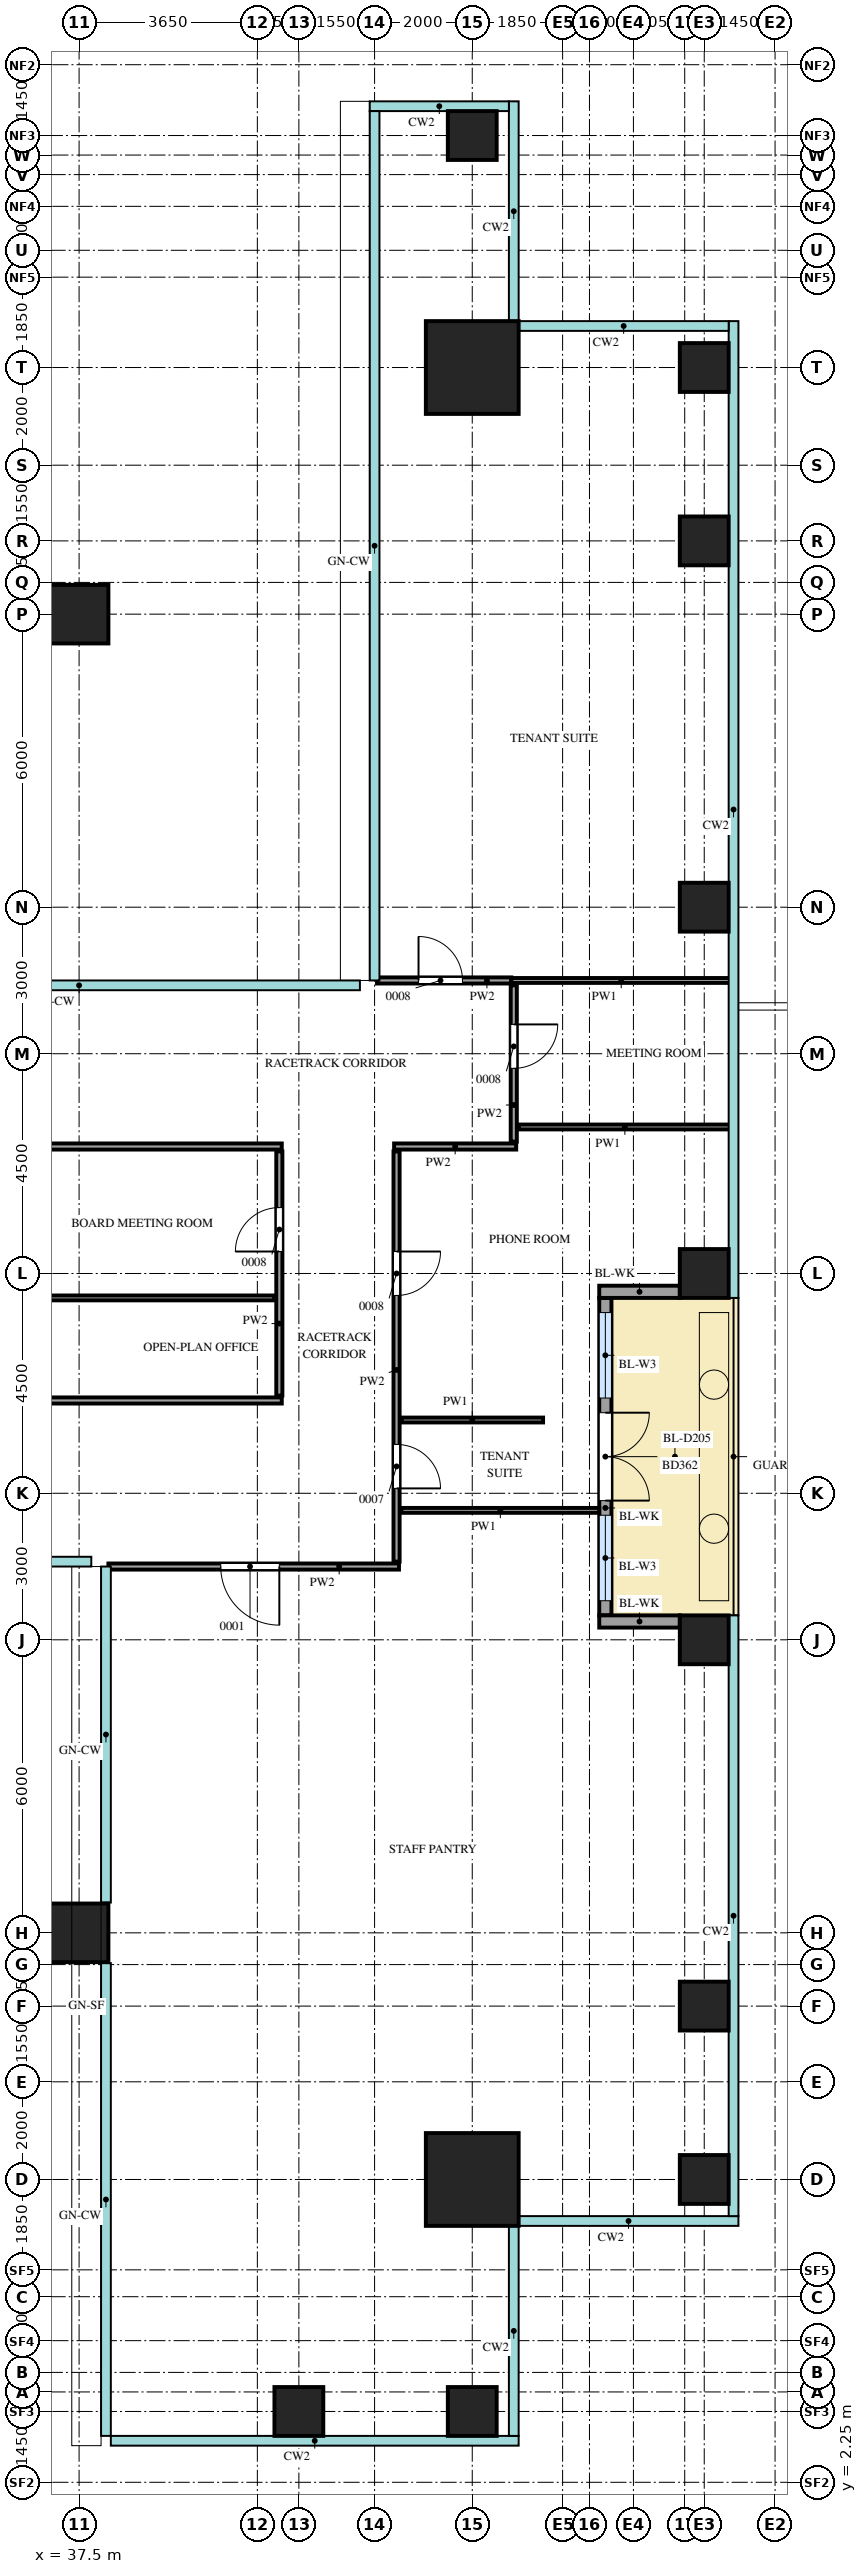
"""IFC4 building model, lengths in metres.
Left out: names, types, materials, properties, quantities, classifications, styles, units other than length and angle.
Written with IfcOpenShell. Run it as: python <this file> out.ifc"""

import sys

from ifc_helpers import new_model, si_unit, direction, frame, frame_2d, origin, origin_2d, place, context, subcontext, project, spatial, rectangle, extrude, source, transform, mapped, element, fill, save


model = new_model("IFC4")
c1 = context("Model", 3, precision=1e-05, world=origin(), true_north=direction((0.0, 1.0)))
c2 = subcontext(c1, "Body", "Model", "MODEL_VIEW")
j1 = project(units=[si_unit("LENGTHUNIT", "METRE"), si_unit("PLANEANGLEUNIT", "RADIAN")], contexts=[c1])
p1 = place(None, origin())
s1 = spatial("IfcSite", under=j1, at=p1, CompositionType="ELEMENT")
p2 = place(p1, origin())
s2 = spatial("IfcBuilding", under=s1, at=p2, CompositionType="ELEMENT")
p3 = place(p2, frame((0.0, 0.0, 168.7)))
s3 = spatial("IfcBuildingStorey", under=s2, at=p3, CompositionType="ELEMENT", Elevation=168.7)
m1 = source(origin(), c2, "Body", "SweptSolid", [
    extrude(rectangle(XDim=1.9, YDim=1.9, at=origin_2d()), origin(), (0.0, 0.0, 1.0), 4.0),
])
for number, where, z_axis, x_axis in (
    (1, (45.55, 45.55, 0.0), (0.0, 0.0, 1.0), (1.0, 0.0, 0.0)),
    (2, (45.55, 8.45, 0.0), (0.0, 0.0, 1.0), (1.0, 0.0, 0.0)),
):
    element("IfcColumn", number, at=place(p3, frame(where, z_axis=z_axis, x_axis=x_axis)), inside=s3, PredefinedType="COLUMN", context=c2, shape_type="MappedRepresentation", body=[
        mapped(m1, transform((0.0, 0.0, 0.0))),
    ])
m2 = source(origin(), c2, "Body", "SweptSolid", [
    extrude(rectangle(XDim=1.0, YDim=1.0, at=origin_2d()), origin(), (0.0, 0.0, 1.0), 3.75),
])
for number, where, z_axis, x_axis in (
    (3, (42.0, 3.7, 0.0), (0.0, 0.0, 1.0), (1.0, 0.0, 0.0)),
    (4, (45.55, 3.7, 0.0), (0.0, 0.0, 1.0), (1.0, 0.0, 0.0)),
    (5, (50.3, 8.45, 0.0), (0.0, 0.0, 1.0), (1.0, 0.0, 0.0)),
    (6, (50.3, 12.0, 0.0), (0.0, 0.0, 1.0), (1.0, 0.0, 0.0)),
    (7, (50.3, 19.5, 0.0), (0.0, 0.0, 1.0), (1.0, 0.0, 0.0)),
    (8, (50.3, 27.0, 0.0), (0.0, 0.0, 1.0), (1.0, 0.0, 0.0)),
    (9, (50.3, 34.5, 0.0), (0.0, 0.0, 1.0), (1.0, 0.0, 0.0)),
    (10, (50.3, 42.0, 0.0), (0.0, 0.0, 1.0), (1.0, 0.0, 0.0)),
    (11, (50.3, 45.55, 0.0), (0.0, 0.0, 1.0), (1.0, 0.0, 0.0)),
    (12, (45.55, 50.3, 0.0), (0.0, 0.0, 1.0), (1.0, 0.0, 0.0)),
):
    element("IfcColumn", number, at=place(p3, frame(where, z_axis=z_axis, x_axis=x_axis)), inside=s3, PredefinedType="COLUMN", context=c2, shape_type="MappedRepresentation", body=[
        mapped(m2, transform((0.0, 0.0, 0.0))),
    ])
m3 = source(origin(), c2, "Body", "SweptSolid", [
    extrude(rectangle(XDim=1.2, YDim=1.2, at=origin_2d()), origin(), (0.0, 0.0, 1.0), 4.0),
])
for number, where, z_axis, x_axis in (
    (13, (37.5, 13.5, 0.0), (0.0, 0.0, 1.0), (1.0, 0.0, 0.0)),
    (14, (37.5, 40.5, 0.0), (0.0, 0.0, 1.0), (1.0, 0.0, 0.0)),
):
    element("IfcColumn", number, at=place(p3, frame(where, z_axis=z_axis, x_axis=x_axis)), inside=s3, PredefinedType="COLUMN", context=c2, shape_type="MappedRepresentation", body=[
        mapped(m3, transform((0.0, 0.0, 0.0))),
    ])
m4 = source(origin(), c2, "Body", "SweptSolid", [
    extrude(rectangle(XDim=6.5, YDim=0.25, at=frame_2d((3.25, 0.0))), origin(), (0.0, 0.0, 1.0), 3.15),
])
p4 = place(p3, frame((48.275, 20.0, 0.0), z_axis=(0.0, 0.0, 1.0), x_axis=(0.0, 1.0, 0.0)))
e15 = element("IfcWall", 15, at=p4, inside=s3, PredefinedType="SOLIDWALL", context=c2, shape_type="MappedRepresentation", body=[
    mapped(m4, transform((0.0, 0.0, 0.0))),
])
m5 = source(origin(), c2, "Body", "SweptSolid", [
    extrude(rectangle(XDim=1.75, YDim=2.4, at=frame_2d((0.875, 1.2))), frame((0.0, 0.135, 0.0), z_axis=(0.0, -1.0, 0.0), x_axis=(1.0, 0.0, 0.0)), (0.0, 0.0, 1.0), 0.27),
])
p5 = place(p4, frame((0.3, 0.0, 0.0)))
e16 = element("IfcOpeningElement", 16, at=p5, cuts=e15, PredefinedType="OPENING", context=c2, shape_type="MappedRepresentation", body=[
    mapped(m5, transform((0.0, 0.0, 0.0))),
])
p6 = place(p4, frame((4.45, 0.0, 0.0)))
e17 = element("IfcOpeningElement", 17, at=p6, cuts=e15, PredefinedType="OPENING", context=c2, shape_type="MappedRepresentation", body=[
    mapped(m5, transform((0.0, 0.0, 0.0))),
])
m6 = source(origin(), c2, "Body", "SweptSolid", [
    extrude(rectangle(XDim=1.8, YDim=2.4, at=frame_2d((0.9, 1.2))), frame((0.0, 0.135, 0.0), z_axis=(0.0, -1.0, 0.0), x_axis=(1.0, 0.0, 0.0)), (0.0, 0.0, 1.0), 0.27),
])
p7 = place(p4, frame((2.35, 0.0, 0.0)))
e18 = element("IfcOpeningElement", 18, at=p7, cuts=e15, PredefinedType="OPENING", context=c2, shape_type="MappedRepresentation", body=[
    mapped(m6, transform((0.0, 0.0, 0.0))),
])
m7 = source(origin(), c2, "Body", "SweptSolid", [
    extrude(rectangle(XDim=1.65, YDim=0.25, at=frame_2d((0.825, 0.0))), origin(), (0.0, 0.0, 1.0), 3.15),
])
for number, where, z_axis, x_axis in (
    (19, (49.8, 19.875, 0.0), (0.0, 0.0, 1.0), (-1.0, 0.0, 0.0)),
    (20, (49.8, 26.625, 0.0), (0.0, 0.0, 1.0), (-1.0, 0.0, 0.0)),
):
    element("IfcWall", number, at=place(p3, frame(where, z_axis=z_axis, x_axis=x_axis)), inside=s3, PredefinedType="SOLIDWALL", context=c2, shape_type="MappedRepresentation", body=[
        mapped(m7, transform((0.0, 0.0, 0.0))),
    ])
m8 = source(origin(), c2, "Body", "SweptSolid", [
    extrude(rectangle(XDim=5.95, YDim=0.125, at=frame_2d((2.975, 0.0))), origin(), (0.0, 0.0, 1.0), 3.8),
])
p8 = place(p3, frame((38.1, 21.0, 0.0), z_axis=(0.0, 0.0, 1.0), x_axis=(1.0, 0.0, 0.0)))
e21 = element("IfcWall", 21, at=p8, inside=s3, PredefinedType="PARTITIONING", context=c2, shape_type="MappedRepresentation", body=[
    mapped(m8, transform((0.0, 0.0, 0.0))),
])
m9 = source(origin(), c2, "Body", "SweptSolid", [
    extrude(rectangle(XDim=1.2, YDim=2.1, at=frame_2d((0.6, 1.05))), frame((0.0, 0.073, 0.0), z_axis=(0.0, -1.0, 0.0), x_axis=(1.0, 0.0, 0.0)), (0.0, 0.0, 1.0), 0.145),
])
p9 = place(p8, frame((2.3, 0.0, 0.0)))
e22 = element("IfcOpeningElement", 22, at=p9, cuts=e21, PredefinedType="OPENING", context=c2, shape_type="MappedRepresentation", body=[
    mapped(m9, transform((0.0, 0.0, 0.0))),
])
m10 = source(origin(), c2, "Body", "SweptSolid", [
    extrude(rectangle(XDim=8.4, YDim=0.125, at=frame_2d((4.2, 0.0))), origin(), (0.0, 0.0, 1.0), 3.8),
])
p10 = place(p3, frame((44.0, 21.1, 0.0), z_axis=(0.0, 0.0, 1.0), x_axis=(0.0, 1.0, 0.0)))
e23 = element("IfcWall", 23, at=p10, inside=s3, PredefinedType="PARTITIONING", context=c2, shape_type="MappedRepresentation", body=[
    mapped(m10, transform((0.0, 0.0, 0.0))),
])
m11 = source(origin(), c2, "Body", "SweptSolid", [
    extrude(rectangle(XDim=0.9, YDim=2.1, at=frame_2d((0.45, 1.05))), frame((0.0, 0.073, 0.0), z_axis=(0.0, -1.0, 0.0), x_axis=(1.0, 0.0, 0.0)), (0.0, 0.0, 1.0), 0.145),
])
p11 = place(p10, frame((1.5, 0.0, 0.0)))
e24 = element("IfcOpeningElement", 24, at=p11, cuts=e23, PredefinedType="OPENING", context=c2, shape_type="MappedRepresentation", body=[
    mapped(m11, transform((0.0, 0.0, 0.0))),
])
p12 = place(p10, frame((5.45, 0.0, 0.0)))
e25 = element("IfcOpeningElement", 25, at=p12, cuts=e23, PredefinedType="OPENING", context=c2, shape_type="MappedRepresentation", body=[
    mapped(m11, transform((0.0, 0.0, 0.0))),
])
m12 = source(origin(), c2, "Body", "SweptSolid", [
    extrude(rectangle(XDim=4.05, YDim=0.1, at=frame_2d((2.025, 0.0))), origin(), (0.0, 0.0, 1.0), 3.8),
])
p13 = place(p3, frame((44.1, 22.15, 0.0), z_axis=(0.0, 0.0, 1.0), x_axis=(1.0, 0.0, 0.0)))
e26 = element("IfcWall", 26, at=p13, inside=s3, PredefinedType="PARTITIONING", context=c2, shape_type="MappedRepresentation", body=[
    mapped(m12, transform((0.0, 0.0, 0.0))),
])
m13 = source(origin(), c2, "Body", "SweptSolid", [
    extrude(rectangle(XDim=2.9, YDim=0.1, at=frame_2d((1.45, 0.0))), origin(), (0.0, 0.0, 1.0), 3.8),
])
p14 = place(p3, frame((44.1, 24.0, 0.0), z_axis=(0.0, 0.0, 1.0), x_axis=(1.0, 0.0, 0.0)))
e27 = element("IfcWall", 27, at=p14, inside=s3, PredefinedType="PARTITIONING", context=c2, shape_type="MappedRepresentation", body=[
    mapped(m13, transform((0.0, 0.0, 0.0))),
])
m14 = source(origin(), c2, "Body", "SweptSolid", [
    extrude(rectangle(XDim=18.3, YDim=0.125, at=frame_2d((9.15, 0.0))), origin(), (0.0, 0.0, 1.0), 3.8),
])
p15 = place(p3, frame((23.35, 24.4, 0.0), z_axis=(0.0, 0.0, 1.0), x_axis=(1.0, 0.0, 0.0)))
e28 = element("IfcWall", 28, at=p15, inside=s3, PredefinedType="PARTITIONING", context=c2, shape_type="MappedRepresentation", body=[
    mapped(m14, transform((0.0, 0.0, 0.0))),
])
m15 = source(origin(), c2, "Body", "SweptSolid", [
    extrude(rectangle(XDim=5.0, YDim=0.125, at=frame_2d((2.5, 0.0))), origin(), (0.0, 0.0, 1.0), 3.8),
])
p16 = place(p3, frame((41.6, 24.5, 0.0), z_axis=(0.0, 0.0, 1.0), x_axis=(0.0, 1.0, 0.0)))
e29 = element("IfcWall", 29, at=p16, inside=s3, PredefinedType="PARTITIONING", context=c2, shape_type="MappedRepresentation", body=[
    mapped(m15, transform((0.0, 0.0, 0.0))),
])
p17 = place(p16, frame((2.95, 0.0, 0.0)))
e30 = element("IfcOpeningElement", 30, at=p17, cuts=e29, PredefinedType="OPENING", context=c2, shape_type="MappedRepresentation", body=[
    mapped(m11, transform((0.0, 0.0, 0.0))),
])
m16 = source(origin(), c2, "Body", "SweptSolid", [
    extrude(rectangle(XDim=18.0, YDim=0.1, at=frame_2d((9.0, 0.0))), origin(), (0.0, 0.0, 1.0), 3.8),
])
p18 = place(p3, frame((23.5, 26.5, 0.0), z_axis=(0.0, 0.0, 1.0), x_axis=(1.0, 0.0, 0.0)))
e31 = element("IfcWall", 31, at=p18, inside=s3, PredefinedType="PARTITIONING", context=c2, shape_type="MappedRepresentation", body=[
    mapped(m16, transform((0.0, 0.0, 0.0))),
])
p19 = place(p3, frame((23.35, 29.6, 0.0), z_axis=(0.0, 0.0, 1.0), x_axis=(1.0, 0.0, 0.0)))
e32 = element("IfcWall", 32, at=p19, inside=s3, PredefinedType="PARTITIONING", context=c2, shape_type="MappedRepresentation", body=[
    mapped(m14, transform((0.0, 0.0, 0.0))),
])
m17 = source(origin(), c2, "Body", "SweptSolid", [
    extrude(rectangle(XDim=2.5, YDim=0.125, at=frame_2d((1.25, 0.0))), origin(), (0.0, 0.0, 1.0), 3.8),
])
p20 = place(p3, frame((43.95, 29.6, 0.0), z_axis=(0.0, 0.0, 1.0), x_axis=(1.0, 0.0, 0.0)))
e33 = element("IfcWall", 33, at=p20, inside=s3, PredefinedType="PARTITIONING", context=c2, shape_type="MappedRepresentation", body=[
    mapped(m17, transform((0.0, 0.0, 0.0))),
])
m18 = source(origin(), c2, "Body", "SweptSolid", [
    extrude(rectangle(XDim=3.2, YDim=0.125, at=frame_2d((1.6, 0.0))), origin(), (0.0, 0.0, 1.0), 3.8),
])
p21 = place(p3, frame((46.4, 29.7, 0.0), z_axis=(0.0, 0.0, 1.0), x_axis=(0.0, 1.0, 0.0)))
e34 = element("IfcWall", 34, at=p21, inside=s3, PredefinedType="PARTITIONING", context=c2, shape_type="MappedRepresentation", body=[
    mapped(m18, transform((0.0, 0.0, 0.0))),
])
p22 = place(p21, frame((1.5, 0.0, 0.0)))
e35 = element("IfcOpeningElement", 35, at=p22, cuts=e34, PredefinedType="OPENING", context=c2, shape_type="MappedRepresentation", body=[
    mapped(m11, transform((0.0, 0.0, 0.0))),
])
m19 = source(origin(), c2, "Body", "SweptSolid", [
    extrude(rectangle(XDim=4.35, YDim=0.1, at=frame_2d((2.175, 0.0))), origin(), (0.0, 0.0, 1.0), 3.8),
])
p23 = place(p3, frame((46.5, 30.0, 0.0), z_axis=(0.0, 0.0, 1.0), x_axis=(1.0, 0.0, 0.0)))
e36 = element("IfcWall", 36, at=p23, inside=s3, PredefinedType="PARTITIONING", context=c2, shape_type="MappedRepresentation", body=[
    mapped(m19, transform((0.0, 0.0, 0.0))),
])
m20 = source(origin(), c2, "Body", "SweptSolid", [
    extrude(rectangle(XDim=2.75, YDim=0.125, at=frame_2d((1.375, 0.0))), origin(), (0.0, 0.0, 1.0), 3.8),
])
p24 = place(p3, frame((43.6, 33.0, 0.0), z_axis=(0.0, 0.0, 1.0), x_axis=(1.0, 0.0, 0.0)))
e37 = element("IfcWall", 37, at=p24, inside=s3, PredefinedType="PARTITIONING", context=c2, shape_type="MappedRepresentation", body=[
    mapped(m20, transform((0.0, 0.0, 0.0))),
])
p25 = place(p24, frame((0.85, 0.0, 0.0)))
e38 = element("IfcOpeningElement", 38, at=p25, cuts=e37, PredefinedType="OPENING", context=c2, shape_type="MappedRepresentation", body=[
    mapped(m11, transform((0.0, 0.0, 0.0))),
])
m21 = source(origin(), c2, "Body", "SweptSolid", [
    extrude(rectangle(XDim=4.5, YDim=0.1, at=frame_2d((2.25, 0.0))), origin(), (0.0, 0.0, 1.0), 3.8),
])
p26 = place(p3, frame((46.35, 33.0, 0.0), z_axis=(0.0, 0.0, 1.0), x_axis=(1.0, 0.0, 0.0)))
e39 = element("IfcWall", 39, at=p26, inside=s3, PredefinedType="PARTITIONING", context=c2, shape_type="MappedRepresentation", body=[
    mapped(m21, transform((0.0, 0.0, 0.0))),
])
m22 = source(origin(), c2, "Body", "SweptSolid", [
    extrude(rectangle(XDim=1.75, YDim=2.4, at=frame_2d((0.875, 1.2))), frame((0.0, 0.03, 0.0), z_axis=(0.0, -1.0, 0.0), x_axis=(1.0, 0.0, 0.0)), (0.0, 0.0, 1.0), 0.06),
])
p27 = place(p5, origin())
e40 = element("IfcWindow", 40, at=p27, inside=s3, PartitioningType="SINGLE_PANEL", PredefinedType="WINDOW", context=c2, shape_type="MappedRepresentation", body=[
    mapped(m22, transform((0.0, 0.0, 0.0))),
])
fill(e16, e40)
p28 = place(p6, origin())
e41 = element("IfcWindow", 41, at=p28, inside=s3, PartitioningType="SINGLE_PANEL", PredefinedType="WINDOW", context=c2, shape_type="MappedRepresentation", body=[
    mapped(m22, transform((0.0, 0.0, 0.0))),
])
fill(e17, e41)
m23 = source(origin(), c2, "Body", "SweptSolid", [
    extrude(rectangle(XDim=1.8, YDim=2.4, at=frame_2d((0.9, 1.2))), frame((0.0, 0.025, 0.0), z_axis=(0.0, -1.0, 0.0), x_axis=(1.0, 0.0, 0.0)), (0.0, 0.0, 1.0), 0.05),
])
p29 = place(p7, origin())
e42 = element("IfcDoor", 42, at=p29, inside=s3, OperationType="DOUBLE_DOOR_DOUBLE_SWING", PredefinedType="DOOR", context=c2, shape_type="MappedRepresentation", body=[
    mapped(m23, transform((0.0, 0.0, 0.0))),
])
fill(e18, e42)
m24 = source(origin(), c2, "Body", "SweptSolid", [
    extrude(rectangle(XDim=1.2, YDim=2.1, at=frame_2d((0.6, 1.05))), frame((0.0, 0.025, 0.0), z_axis=(0.0, -1.0, 0.0), x_axis=(1.0, 0.0, 0.0)), (0.0, 0.0, 1.0), 0.05),
])
p30 = place(p9, origin())
e43 = element("IfcDoor", 43, at=p30, inside=s3, OperationType="SINGLE_SWING_RIGHT", PredefinedType="DOOR", context=c2, shape_type="MappedRepresentation", body=[
    mapped(m24, transform((0.0, 0.0, 0.0))),
])
fill(e22, e43)
m25 = source(origin(), c2, "Body", "SweptSolid", [
    extrude(rectangle(XDim=0.9, YDim=2.1, at=frame_2d((0.45, 1.05))), frame((0.0, 0.025, 0.0), z_axis=(0.0, -1.0, 0.0), x_axis=(1.0, 0.0, 0.0)), (0.0, 0.0, 1.0), 0.05),
])
p31 = place(p25, origin())
e44 = element("IfcDoor", 44, at=p31, inside=s3, OperationType="SINGLE_SWING_RIGHT", PredefinedType="DOOR", context=c2, shape_type="MappedRepresentation", body=[
    mapped(m25, transform((0.0, 0.0, 0.0))),
])
fill(e38, e44)
p32 = place(p11, origin())
e45 = element("IfcDoor", 45, at=p32, inside=s3, OperationType="SINGLE_SWING_LEFT", PredefinedType="DOOR", context=c2, shape_type="MappedRepresentation", body=[
    mapped(m25, transform((0.0, 0.0, 0.0))),
])
fill(e24, e45)
p33 = place(p12, origin())
e46 = element("IfcDoor", 46, at=p33, inside=s3, OperationType="SINGLE_SWING_RIGHT", PredefinedType="DOOR", context=c2, shape_type="MappedRepresentation", body=[
    mapped(m25, transform((0.0, 0.0, 0.0))),
])
fill(e25, e46)
p34 = place(p22, origin())
e47 = element("IfcDoor", 47, at=p34, inside=s3, OperationType="SINGLE_SWING_RIGHT", PredefinedType="DOOR", context=c2, shape_type="MappedRepresentation", body=[
    mapped(m25, transform((0.0, 0.0, 0.0))),
])
fill(e35, e47)
p35 = place(p17, origin())
e48 = element("IfcDoor", 48, at=p35, inside=s3, OperationType="SINGLE_SWING_RIGHT", PredefinedType="DOOR", context=c2, shape_type="MappedRepresentation", body=[
    mapped(m25, transform((0.0, 0.0, 0.0))),
])
fill(e30, e48)
save(model, sys.argv[1])
